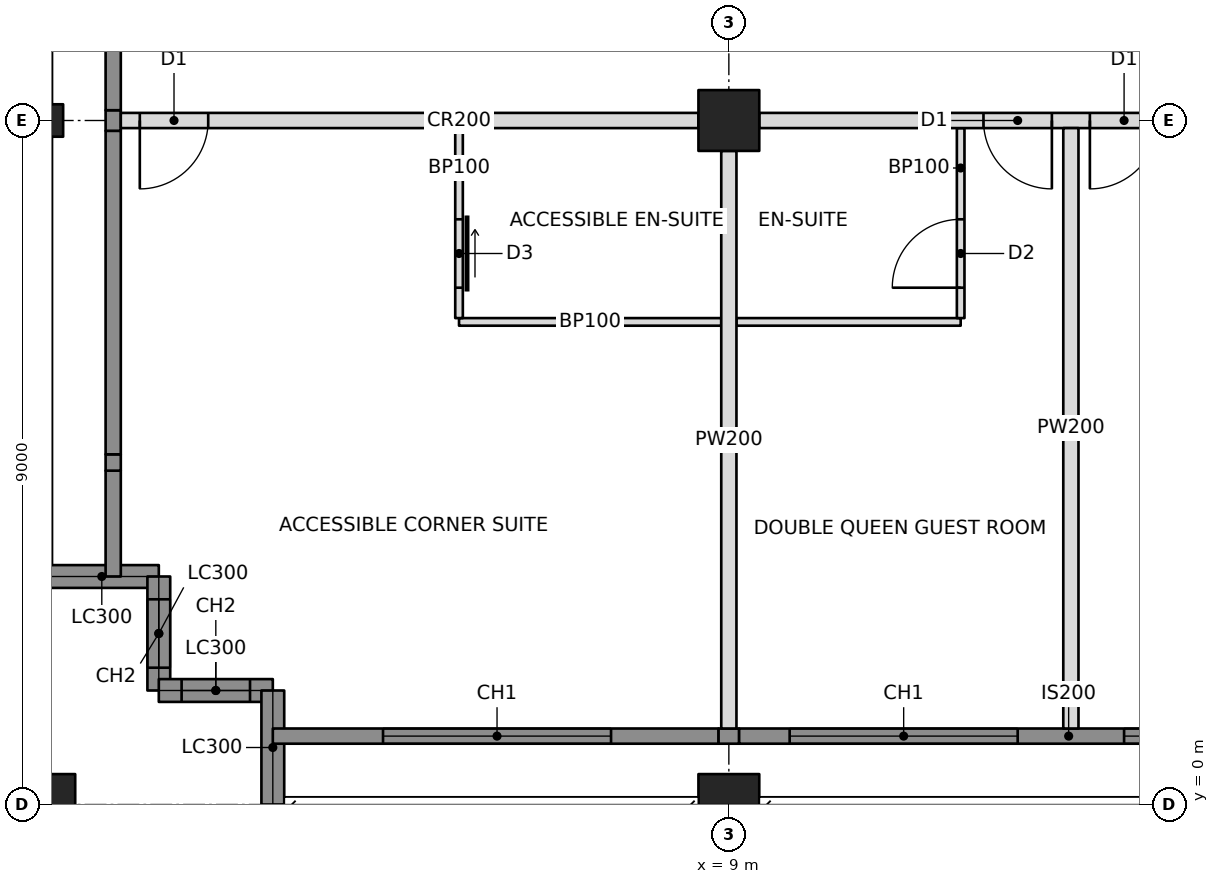
"""IFC4 building model, lengths in metres.
Left out: names, types, materials, properties, quantities, classifications, styles, units other than length and angle.
Written with IfcOpenShell. Run it as: python <this file> out.ifc"""

import sys

from ifc_helpers import new_model, si_unit, direction, frame, frame_2d, origin, origin_with_axes, origin_2d, place, context, subcontext, project, spatial, rectangle, hollow_rectangle, i_section, extrude, element, fill, save


model = new_model("IFC4")
c1 = context("Model", 3, precision=1e-05, world=origin(), true_north=direction((0.0, 1.0)))
c2 = subcontext(c1, "Body", "Model", "MODEL_VIEW")
j1 = project(units=[si_unit("LENGTHUNIT", "METRE"), si_unit("PLANEANGLEUNIT", "RADIAN")], contexts=[c1])
p1 = place(None, origin())
s1 = spatial("IfcSite", under=j1, at=p1, CompositionType="ELEMENT")
p2 = place(p1, origin())
s2 = spatial("IfcBuilding", under=s1, at=p2, CompositionType="ELEMENT")
p3 = place(p2, frame((0.0, 0.0, 211.4)))
s3 = spatial("IfcBuildingStorey", under=s2, at=p3, CompositionType="ELEMENT", Elevation=211.4)
p4 = place(p3, origin_with_axes())
e1 = element("IfcColumn", 1, at=p4, inside=s3, PredefinedType="COLUMN", context=c2, shape_type="SweptSolid", body=[
    extrude(hollow_rectangle(XDim=0.8, YDim=0.8, WallThickness=0.06, at=origin_2d()), origin(), (0.0, 0.0, 1.0), 3.4),
])
p5 = place(p3, frame((0.0, 9.0, 0.0), z_axis=(0.0, 0.0, 1.0), x_axis=(0.0, 1.0, 0.0)))
e2 = element("IfcColumn", 2, at=p5, inside=s3, PredefinedType="COLUMN", context=c2, shape_type="SweptSolid", body=[
    extrude(i_section(OverallWidth=0.427, OverallDepth=0.483, WebThickness=0.051, FlangeThickness=0.082, at=origin_2d()), origin(), (0.0, 0.0, 1.0), 3.4),
])
p6 = place(p3, frame((9.0, 0.0, 0.0), z_axis=(0.0, 0.0, 1.0), x_axis=(1.0, 0.0, 0.0)))
e3 = element("IfcColumn", 3, at=p6, inside=s3, PredefinedType="COLUMN", context=c2, shape_type="SweptSolid", body=[
    extrude(hollow_rectangle(XDim=0.8, YDim=0.8, WallThickness=0.06, at=origin_2d()), origin(), (0.0, 0.0, 1.0), 3.4),
])
p7 = place(p3, frame((9.0, 9.0, 0.0), z_axis=(0.0, 0.0, 1.0), x_axis=(1.0, 0.0, 0.0)))
e4 = element("IfcColumn", 4, at=p7, inside=s3, PredefinedType="COLUMN", context=c2, shape_type="SweptSolid", body=[
    extrude(hollow_rectangle(XDim=0.8, YDim=0.8, WallThickness=0.05, at=origin_2d()), origin(), (0.0, 0.0, 1.0), 3.4),
])
p8 = place(p3, frame((0.0, 3.0, 0.0), z_axis=(0.0, 0.0, 1.0), x_axis=(1.0, 0.0, 0.0)))
e5 = element("IfcWall", 5, at=p8, inside=s3, PredefinedType="SOLIDWALL", context=c2, shape_type="SweptSolid", body=[
    extrude(rectangle(XDim=1.5, YDim=0.3, at=frame_2d((0.75, 0.0))), origin(), (0.0, 0.0, 1.0), 2.42),
])
p9 = place(p3, frame((1.5, 3.0, 0.0), z_axis=(0.0, 0.0, 1.0), x_axis=(0.0, -1.0, 0.0)))
e6 = element("IfcWall", 6, at=p9, inside=s3, PredefinedType="SOLIDWALL", context=c2, shape_type="SweptSolid", body=[
    extrude(rectangle(XDim=1.5, YDim=0.3, at=frame_2d((0.75, 0.0))), origin(), (0.0, 0.0, 1.0), 3.2),
])
p10 = place(p9, frame((0.3, 0.0, 0.6)))
e7 = element("IfcOpeningElement", 7, at=p10, cuts=e6, PredefinedType="OPENING", context=c2, shape_type="SweptSolid", body=[
    extrude(rectangle(XDim=0.9, YDim=2.2, at=frame_2d((0.45, 1.1))), frame((0.0, 0.16, 0.0), z_axis=(0.0, -1.0, 0.0), x_axis=(1.0, 0.0, 0.0)), (0.0, 0.0, 1.0), 0.32),
])
p11 = place(p3, frame((1.5, 1.5, 0.0), z_axis=(0.0, 0.0, 1.0), x_axis=(1.0, 0.0, 0.0)))
e8 = element("IfcWall", 8, at=p11, inside=s3, PredefinedType="SOLIDWALL", context=c2, shape_type="SweptSolid", body=[
    extrude(rectangle(XDim=1.5, YDim=0.3, at=frame_2d((0.75, 0.0))), origin(), (0.0, 0.0, 1.0), 3.2),
])
p12 = place(p11, frame((0.3, 0.0, 0.6)))
e9 = element("IfcOpeningElement", 9, at=p12, cuts=e8, PredefinedType="OPENING", context=c2, shape_type="SweptSolid", body=[
    extrude(rectangle(XDim=0.9, YDim=2.2, at=frame_2d((0.45, 1.1))), frame((0.0, 0.16, 0.0), z_axis=(0.0, -1.0, 0.0), x_axis=(1.0, 0.0, 0.0)), (0.0, 0.0, 1.0), 0.32),
])
p13 = place(p3, frame((3.0, 1.5, 0.0), z_axis=(0.0, 0.0, 1.0), x_axis=(0.0, -1.0, 0.0)))
e10 = element("IfcWall", 10, at=p13, inside=s3, PredefinedType="SOLIDWALL", context=c2, shape_type="SweptSolid", body=[
    extrude(rectangle(XDim=1.5, YDim=0.3, at=frame_2d((0.75, 0.0))), origin(), (0.0, 0.0, 1.0), 2.42),
])
p14 = place(p3, frame((3.0, 0.9, 0.0), z_axis=(0.0, 0.0, 1.0), x_axis=(1.0, 0.0, 0.0)))
e11 = element("IfcWall", 11, at=p14, inside=s3, PredefinedType="SOLIDWALL", context=c2, shape_type="SweptSolid", body=[
    extrude(rectangle(XDim=5.865, YDim=0.2, at=frame_2d((2.932, 0.0))), origin(), (0.0, 0.0, 1.0), 3.2),
])
p15 = place(p14, frame((1.45, 0.0, 0.6)))
e12 = element("IfcOpeningElement", 12, at=p15, cuts=e11, PredefinedType="OPENING", context=c2, shape_type="SweptSolid", body=[
    extrude(rectangle(XDim=3.0, YDim=2.2, at=frame_2d((1.5, 1.1))), frame((0.0, 0.11, 0.0), z_axis=(0.0, -1.0, 0.0), x_axis=(1.0, 0.0, 0.0)), (0.0, 0.0, 1.0), 0.22),
])
p16 = place(p3, frame((0.9, 3.0, 0.0), z_axis=(0.0, 0.0, 1.0), x_axis=(0.0, 1.0, 0.0)))
e13 = element("IfcWall", 13, at=p16, inside=s3, PredefinedType="SOLIDWALL", context=c2, shape_type="SweptSolid", body=[
    extrude(rectangle(XDim=1.393, YDim=0.2, at=frame_2d((0.696, 0.0))), origin(), (0.0, 0.0, 1.0), 3.2),
])
p17 = place(p3, frame((1.0, 9.0, 0.0), z_axis=(0.0, 0.0, 1.0), x_axis=(1.0, 0.0, 0.0)))
e14 = element("IfcWall", 14, at=p17, inside=s3, PredefinedType="PARTITIONING", context=c2, shape_type="SweptSolid", body=[
    extrude(rectangle(XDim=7.6, YDim=0.2, at=frame_2d((3.8, 0.0))), origin(), (0.0, 0.0, 1.0), 2.438),
])
p18 = place(p17, frame((0.25, 0.0, 0.0)))
e15 = element("IfcOpeningElement", 15, at=p18, cuts=e14, PredefinedType="OPENING", context=c2, shape_type="SweptSolid", body=[
    extrude(rectangle(XDim=0.9, YDim=2.1, at=frame_2d((0.45, 1.05))), frame((0.0, 0.11, 0.0), z_axis=(0.0, -1.0, 0.0), x_axis=(1.0, 0.0, 0.0)), (0.0, 0.0, 1.0), 0.22),
])
p19 = place(p3, frame((9.4, 9.0, 0.0), z_axis=(0.0, 0.0, 1.0), x_axis=(1.0, 0.0, 0.0)))
e16 = element("IfcWall", 16, at=p19, inside=s3, PredefinedType="PARTITIONING", context=c2, shape_type="SweptSolid", body=[
    extrude(rectangle(XDim=8.2, YDim=0.2, at=frame_2d((4.1, 0.0))), origin(), (0.0, 0.0, 1.0), 2.405),
])
p20 = place(p19, frame((2.95, 0.0, 0.0)))
e17 = element("IfcOpeningElement", 17, at=p20, cuts=e16, PredefinedType="OPENING", context=c2, shape_type="SweptSolid", body=[
    extrude(rectangle(XDim=0.9, YDim=2.1, at=frame_2d((0.45, 1.05))), frame((0.0, 0.11, 0.0), z_axis=(0.0, -1.0, 0.0), x_axis=(1.0, 0.0, 0.0)), (0.0, 0.0, 1.0), 0.22),
])
p21 = place(p19, frame((4.35, 0.0, 0.0)))
e18 = element("IfcOpeningElement", 18, at=p21, cuts=e16, PredefinedType="OPENING", context=c2, shape_type="SweptSolid", body=[
    extrude(rectangle(XDim=0.9, YDim=2.1, at=frame_2d((0.45, 1.05))), frame((0.0, 0.11, 0.0), z_axis=(0.0, -1.0, 0.0), x_axis=(1.0, 0.0, 0.0)), (0.0, 0.0, 1.0), 0.22),
])
p22 = place(p3, frame((9.0, 8.6, 0.0), z_axis=(0.0, 0.0, 1.0), x_axis=(0.0, -1.0, 0.0)))
e19 = element("IfcWall", 19, at=p22, inside=s3, PredefinedType="PARTITIONING", context=c2, shape_type="SweptSolid", body=[
    extrude(rectangle(XDim=7.6, YDim=0.2, at=frame_2d((3.8, 0.0))), origin(), (0.0, 0.0, 1.0), 2.438),
])
p23 = place(p3, frame((13.5, 8.9, 0.0), z_axis=(0.0, 0.0, 1.0), x_axis=(0.0, -1.0, 0.0)))
e20 = element("IfcWall", 20, at=p23, inside=s3, PredefinedType="PARTITIONING", context=c2, shape_type="SweptSolid", body=[
    extrude(rectangle(XDim=7.9, YDim=0.2, at=frame_2d((3.95, 0.0))), origin(), (0.0, 0.0, 1.0), 2.404),
])
p24 = place(p3, frame((5.45, 6.35, 0.0), z_axis=(0.0, 0.0, 1.0), x_axis=(1.0, 0.0, 0.0)))
e21 = element("IfcWall", 21, at=p24, inside=s3, PredefinedType="PARTITIONING", context=c2, shape_type="SweptSolid", body=[
    extrude(rectangle(XDim=3.45, YDim=0.1, at=frame_2d((1.725, 0.0))), origin(), (0.0, 0.0, 1.0), 2.438),
])
p25 = place(p3, frame((5.45, 8.9, 0.0), z_axis=(0.0, 0.0, 1.0), x_axis=(0.0, -1.0, 0.0)))
e22 = element("IfcWall", 22, at=p25, inside=s3, PredefinedType="PARTITIONING", context=c2, shape_type="SweptSolid", body=[
    extrude(rectangle(XDim=2.5, YDim=0.1, at=frame_2d((1.25, 0.0))), origin(), (0.0, 0.0, 1.0), 2.438),
])
p26 = place(p25, frame((1.2, 0.0, 0.0)))
e23 = element("IfcOpeningElement", 23, at=p26, cuts=e22, PredefinedType="OPENING", context=c2, shape_type="SweptSolid", body=[
    extrude(rectangle(XDim=0.9, YDim=2.1, at=frame_2d((0.45, 1.05))), frame((0.0, 0.06, 0.0), z_axis=(0.0, -1.0, 0.0), x_axis=(1.0, 0.0, 0.0)), (0.0, 0.0, 1.0), 0.12),
])
p27 = place(p3, frame((9.1, 6.35, 0.0), z_axis=(0.0, 0.0, 1.0), x_axis=(1.0, 0.0, 0.0)))
e24 = element("IfcWall", 24, at=p27, inside=s3, PredefinedType="PARTITIONING", context=c2, shape_type="SweptSolid", body=[
    extrude(rectangle(XDim=2.95, YDim=0.1, at=frame_2d((1.475, 0.0))), origin(), (0.0, 0.0, 1.0), 2.438),
])
p28 = place(p3, frame((12.05, 8.9, 0.0), z_axis=(0.0, 0.0, 1.0), x_axis=(0.0, -1.0, 0.0)))
e25 = element("IfcWall", 25, at=p28, inside=s3, PredefinedType="PARTITIONING", context=c2, shape_type="SweptSolid", body=[
    extrude(rectangle(XDim=2.5, YDim=0.1, at=frame_2d((1.25, 0.0))), origin(), (0.0, 0.0, 1.0), 2.404),
])
p29 = place(p28, frame((1.2, 0.0, 0.0)))
e26 = element("IfcOpeningElement", 26, at=p29, cuts=e25, PredefinedType="OPENING", context=c2, shape_type="SweptSolid", body=[
    extrude(rectangle(XDim=0.9, YDim=2.1, at=frame_2d((0.45, 1.05))), frame((0.0, 0.06, 0.0), z_axis=(0.0, -1.0, 0.0), x_axis=(1.0, 0.0, 0.0)), (0.0, 0.0, 1.0), 0.12),
])
p30 = place(p3, frame((8.865, 0.9, 0.0), z_axis=(0.0, 0.0, 1.0), x_axis=(1.0, 0.0, 0.0)))
e27 = element("IfcWall", 27, at=p30, inside=s3, PredefinedType="SOLIDWALL", context=c2, shape_type="SweptSolid", body=[
    extrude(rectangle(XDim=0.271, YDim=0.2, at=frame_2d((0.135, 0.0))), origin(), (0.0, 0.0, 1.0), 2.438),
])
p31 = place(p3, frame((9.135, 0.9, 0.0), z_axis=(0.0, 0.0, 1.0), x_axis=(1.0, 0.0, 0.0)))
e28 = element("IfcWall", 28, at=p31, inside=s3, PredefinedType="SOLIDWALL", context=c2, shape_type="SweptSolid", body=[
    extrude(rectangle(XDim=8.671, YDim=0.2, at=frame_2d((4.335, 0.0))), origin(), (0.0, 0.0, 1.0), 3.2),
])
p32 = place(p31, frame((0.665, 0.0, 0.6)))
e29 = element("IfcOpeningElement", 29, at=p32, cuts=e28, PredefinedType="OPENING", context=c2, shape_type="SweptSolid", body=[
    extrude(rectangle(XDim=3.0, YDim=2.2, at=frame_2d((1.5, 1.1))), frame((0.0, 0.11, 0.0), z_axis=(0.0, -1.0, 0.0), x_axis=(1.0, 0.0, 0.0)), (0.0, 0.0, 1.0), 0.22),
])
p33 = place(p31, frame((5.065, 0.0, 0.6)))
e30 = element("IfcOpeningElement", 30, at=p33, cuts=e28, PredefinedType="OPENING", context=c2, shape_type="SweptSolid", body=[
    extrude(rectangle(XDim=3.0, YDim=2.2, at=frame_2d((1.5, 1.1))), frame((0.0, 0.11, 0.0), z_axis=(0.0, -1.0, 0.0), x_axis=(1.0, 0.0, 0.0)), (0.0, 0.0, 1.0), 0.22),
])
p34 = place(p3, frame((0.9, 4.393, 0.0), z_axis=(0.0, 0.0, 1.0), x_axis=(0.0, 1.0, 0.0)))
e31 = element("IfcWall", 31, at=p34, inside=s3, PredefinedType="SOLIDWALL", context=c2, shape_type="SweptSolid", body=[
    extrude(rectangle(XDim=0.215, YDim=0.2, at=frame_2d((0.107, 0.0))), origin(), (0.0, 0.0, 1.0), 2.661),
])
p35 = place(p3, frame((0.9, 4.607, 0.0), z_axis=(0.0, 0.0, 1.0), x_axis=(0.0, 1.0, 0.0)))
e32 = element("IfcWall", 32, at=p35, inside=s3, PredefinedType="SOLIDWALL", context=c2, shape_type="SweptSolid", body=[
    extrude(rectangle(XDim=4.257, YDim=0.2, at=frame_2d((2.129, 0.0))), origin(), (0.0, 0.0, 1.0), 3.2),
])
p36 = place(p3, frame((0.9, 8.865, 0.0), z_axis=(0.0, 0.0, 1.0), x_axis=(0.0, 1.0, 0.0)))
e33 = element("IfcWall", 33, at=p36, inside=s3, PredefinedType="SOLIDWALL", context=c2, shape_type="SweptSolid", body=[
    extrude(rectangle(XDim=0.271, YDim=0.2, at=frame_2d((0.135, 0.0))), origin(), (0.0, 0.0, 1.0), 2.438),
])
p37 = place(p3, frame((0.9, 9.135, 0.0), z_axis=(0.0, 0.0, 1.0), x_axis=(0.0, 1.0, 0.0)))
e34 = element("IfcWall", 34, at=p37, inside=s3, PredefinedType="SOLIDWALL", context=c2, shape_type="SweptSolid", body=[
    extrude(rectangle(XDim=8.671, YDim=0.2, at=frame_2d((4.335, 0.0))), origin(), (0.0, 0.0, 1.0), 3.2),
])
p38 = place(p37, frame((2.015, 0.0, 0.6)))
e35 = element("IfcOpeningElement", 35, at=p38, cuts=e34, PredefinedType="OPENING", context=c2, shape_type="SweptSolid", body=[
    extrude(rectangle(XDim=3.0, YDim=2.2, at=frame_2d((1.5, 1.1))), frame((0.0, 0.11, 0.0), z_axis=(0.0, -1.0, 0.0), x_axis=(1.0, 0.0, 0.0)), (0.0, 0.0, 1.0), 0.22),
])
p39 = place(p37, frame((5.515, 0.0, 0.6)))
e36 = element("IfcOpeningElement", 36, at=p39, cuts=e34, PredefinedType="OPENING", context=c2, shape_type="SweptSolid", body=[
    extrude(rectangle(XDim=3.0, YDim=2.2, at=frame_2d((1.5, 1.1))), frame((0.0, 0.11, 0.0), z_axis=(0.0, -1.0, 0.0), x_axis=(1.0, 0.0, 0.0)), (0.0, 0.0, 1.0), 0.22),
])
p40 = place(p10, origin())
e37 = element("IfcWindow", 37, at=p40, inside=s3, PartitioningType="SINGLE_PANEL", PredefinedType="WINDOW", context=c2, shape_type="SweptSolid", body=[
    extrude(rectangle(XDim=0.9, YDim=2.2, at=frame_2d((0.45, 1.1))), frame((0.0, 0.03, 0.0), z_axis=(0.0, -1.0, 0.0), x_axis=(1.0, 0.0, 0.0)), (0.0, 0.0, 1.0), 0.06),
])
fill(e7, e37)
p41 = place(p12, origin())
e38 = element("IfcWindow", 38, at=p41, inside=s3, PartitioningType="SINGLE_PANEL", PredefinedType="WINDOW", context=c2, shape_type="SweptSolid", body=[
    extrude(rectangle(XDim=0.9, YDim=2.2, at=frame_2d((0.45, 1.1))), frame((0.0, 0.03, 0.0), z_axis=(0.0, -1.0, 0.0), x_axis=(1.0, 0.0, 0.0)), (0.0, 0.0, 1.0), 0.06),
])
fill(e9, e38)
p42 = place(p15, origin())
e39 = element("IfcWindow", 39, at=p42, inside=s3, PartitioningType="TRIPLE_PANEL_VERTICAL", PredefinedType="WINDOW", context=c2, shape_type="SweptSolid", body=[
    extrude(rectangle(XDim=3.0, YDim=2.2, at=frame_2d((1.5, 1.1))), frame((0.0, 0.03, 0.0), z_axis=(0.0, -1.0, 0.0), x_axis=(1.0, 0.0, 0.0)), (0.0, 0.0, 1.0), 0.06),
])
fill(e12, e39)
p43 = place(p32, origin())
e40 = element("IfcWindow", 40, at=p43, inside=s3, PartitioningType="TRIPLE_PANEL_VERTICAL", PredefinedType="WINDOW", context=c2, shape_type="SweptSolid", body=[
    extrude(rectangle(XDim=3.0, YDim=2.2, at=frame_2d((1.5, 1.1))), frame((0.0, 0.03, 0.0), z_axis=(0.0, -1.0, 0.0), x_axis=(1.0, 0.0, 0.0)), (0.0, 0.0, 1.0), 0.06),
])
fill(e29, e40)
p44 = place(p33, origin())
e41 = element("IfcWindow", 41, at=p44, inside=s3, PartitioningType="TRIPLE_PANEL_VERTICAL", PredefinedType="WINDOW", context=c2, shape_type="SweptSolid", body=[
    extrude(rectangle(XDim=3.0, YDim=2.2, at=frame_2d((1.5, 1.1))), frame((0.0, 0.03, 0.0), z_axis=(0.0, -1.0, 0.0), x_axis=(1.0, 0.0, 0.0)), (0.0, 0.0, 1.0), 0.06),
])
fill(e30, e41)
p45 = place(p26, origin())
e42 = element("IfcDoor", 42, at=p45, inside=s3, OperationType="SLIDING_TO_LEFT", PredefinedType="DOOR", context=c2, shape_type="SweptSolid", body=[
    extrude(rectangle(XDim=0.9, YDim=2.1, at=frame_2d((0.45, 1.05))), frame((0.0, 0.025, 0.0), z_axis=(0.0, -1.0, 0.0), x_axis=(1.0, 0.0, 0.0)), (0.0, 0.0, 1.0), 0.05),
])
fill(e23, e42)
p46 = place(p18, frame((0.9, 0.0, 0.0), z_axis=(0.0, 0.0, 1.0), x_axis=(-1.0, 0.0, 0.0)))
e43 = element("IfcDoor", 43, at=p46, inside=s3, OperationType="SINGLE_SWING_RIGHT", PredefinedType="DOOR", context=c2, shape_type="SweptSolid", body=[
    extrude(rectangle(XDim=0.9, YDim=2.1, at=frame_2d((0.45, 1.05))), frame((0.0, 0.025, 0.0), z_axis=(0.0, -1.0, 0.0), x_axis=(1.0, 0.0, 0.0)), (0.0, 0.0, 1.0), 0.05),
])
fill(e15, e43)
p47 = place(p29, frame((0.9, 0.0, 0.0), z_axis=(0.0, 0.0, 1.0), x_axis=(-1.0, 0.0, 0.0)))
e44 = element("IfcDoor", 44, at=p47, inside=s3, OperationType="SINGLE_SWING_LEFT", PredefinedType="DOOR", context=c2, shape_type="SweptSolid", body=[
    extrude(rectangle(XDim=0.9, YDim=2.1, at=frame_2d((0.45, 1.05))), frame((0.0, 0.025, 0.0), z_axis=(0.0, -1.0, 0.0), x_axis=(1.0, 0.0, 0.0)), (0.0, 0.0, 1.0), 0.05),
])
fill(e26, e44)
p48 = place(p20, frame((0.9, 0.0, 0.0), z_axis=(0.0, 0.0, 1.0), x_axis=(-1.0, 0.0, 0.0)))
e45 = element("IfcDoor", 45, at=p48, inside=s3, OperationType="SINGLE_SWING_LEFT", PredefinedType="DOOR", context=c2, shape_type="SweptSolid", body=[
    extrude(rectangle(XDim=0.9, YDim=2.1, at=frame_2d((0.45, 1.05))), frame((0.0, 0.025, 0.0), z_axis=(0.0, -1.0, 0.0), x_axis=(1.0, 0.0, 0.0)), (0.0, 0.0, 1.0), 0.05),
])
fill(e17, e45)
p49 = place(p21, frame((0.9, 0.0, 0.0), z_axis=(0.0, 0.0, 1.0), x_axis=(-1.0, 0.0, 0.0)))
e46 = element("IfcDoor", 46, at=p49, inside=s3, OperationType="SINGLE_SWING_RIGHT", PredefinedType="DOOR", context=c2, shape_type="SweptSolid", body=[
    extrude(rectangle(XDim=0.9, YDim=2.1, at=frame_2d((0.45, 1.05))), frame((0.0, 0.025, 0.0), z_axis=(0.0, -1.0, 0.0), x_axis=(1.0, 0.0, 0.0)), (0.0, 0.0, 1.0), 0.05),
])
fill(e18, e46)
save(model, sys.argv[1])
